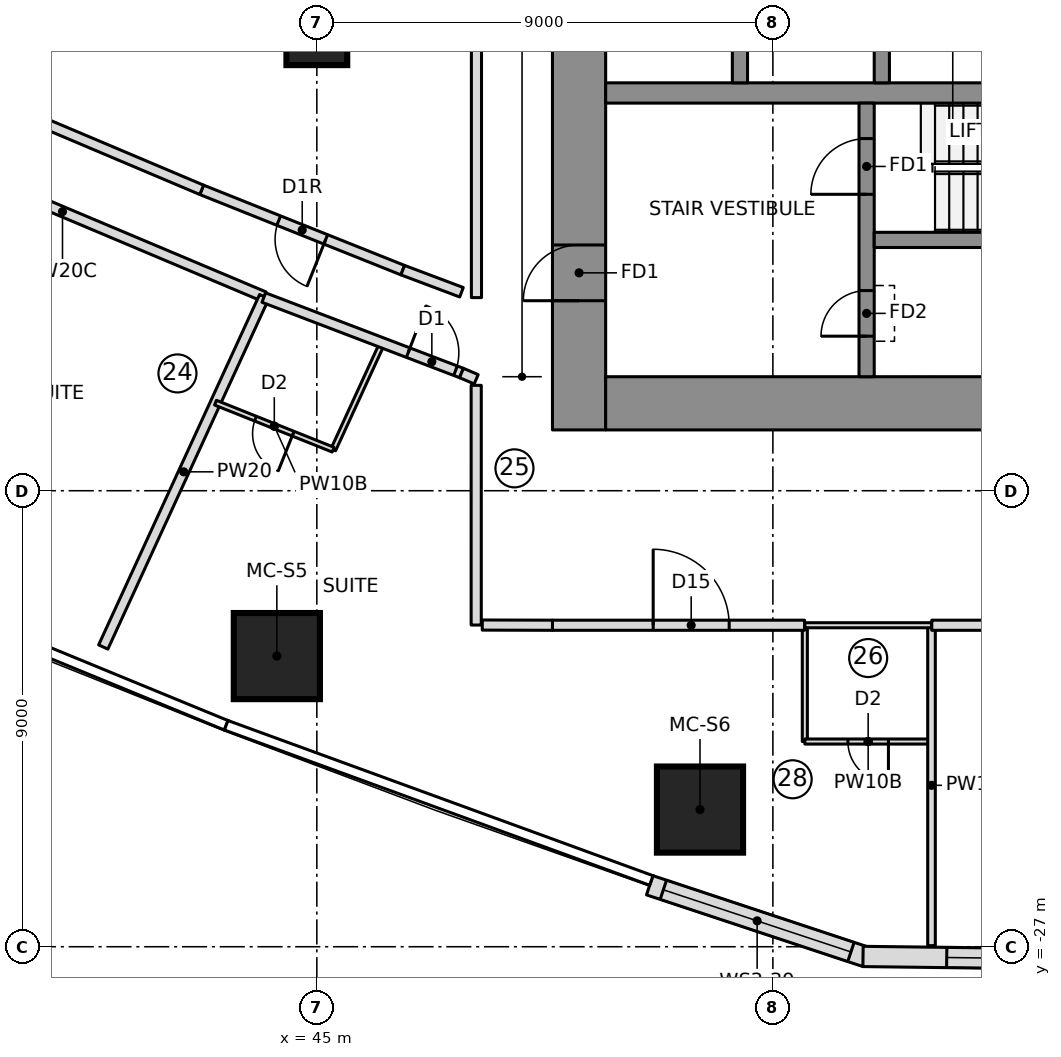
"""IFC4 building model, lengths in metres.
Left out: names, types, materials, properties, quantities, classifications, styles, units other than length and angle.
Written with IfcOpenShell. Run it as: python <this file> out.ifc"""

import sys

from ifc_helpers import new_model, si_unit, direction, frame, frame_2d, origin, origin_2d, place, context, subcontext, project, spatial, polyline, rectangle, outline, extrude, element, fill, save


model = new_model("IFC4")
c1 = context("Model", 3, precision=1e-05, world=origin(), true_north=direction((0.0, 1.0)))
c2 = subcontext(c1, "Body", "Model", "MODEL_VIEW")
j1 = project(units=[si_unit("LENGTHUNIT", "METRE"), si_unit("PLANEANGLEUNIT", "RADIAN")], contexts=[c1])
p1 = place(None, origin())
s1 = spatial("IfcSite", under=j1, at=p1, CompositionType="ELEMENT")
p2 = place(p1, origin())
s2 = spatial("IfcBuilding", under=s1, at=p2, CompositionType="ELEMENT")
p3 = place(p2, frame((0.0, 0.0, 92.0)))
s3 = spatial("IfcBuildingStorey", under=s2, at=p3, CompositionType="ELEMENT", Elevation=92.0)
p4 = place(p3, frame((50.175, -16.8, 0.0), z_axis=(0.0, 0.0, 1.0), x_axis=(0.0, 1.0, 0.0)))
e1 = element("IfcWall", 1, at=p4, inside=s3, PredefinedType="SHEAR", context=c2, shape_type="SweptSolid", body=[
    extrude(rectangle(XDim=10.15, YDim=1.05, at=frame_2d((5.075, 0.0))), origin(), (0.0, 0.0, 1.0), 3.55),
])
p5 = place(p4, frame((2.55, 0.0, 0.0)))
e2 = element("IfcOpeningElement", 2, at=p5, cuts=e1, PredefinedType="OPENING", context=c2, shape_type="SweptSolid", body=[
    extrude(rectangle(XDim=1.1, YDim=2.1, at=frame_2d((0.55, 1.05))), frame((0.0, 0.535, 0.0), z_axis=(0.0, -1.0, 0.0), x_axis=(1.0, 0.0, 0.0)), (0.0, 0.0, 1.0), 1.07),
])
p6 = place(p3, frame((50.7, -16.275, 0.0), z_axis=(0.0, 0.0, 1.0), x_axis=(1.0, 0.0, 0.0)))
e3 = element("IfcWall", 3, at=p6, inside=s3, PredefinedType="SHEAR", context=c2, shape_type="SweptSolid", body=[
    extrude(rectangle(XDim=14.07, YDim=1.05, at=frame_2d((7.035, 0.0))), origin(), (0.0, 0.0, 1.0), 3.55),
])
p7 = place(p3, frame((50.7, -10.15, 0.0), z_axis=(0.0, 0.0, 1.0), x_axis=(1.0, 0.0, 0.0)))
e4 = element("IfcWall", 4, at=p7, inside=s3, PredefinedType="SHEAR", context=c2, shape_type="SweptSolid", body=[
    extrude(rectangle(XDim=13.02, YDim=0.4, at=frame_2d((6.51, 0.0))), origin(), (0.0, 0.0, 1.0), 3.55),
])
for number, where, z_axis, x_axis in (
    (5, (53.35, -9.95, 0.0), (0.0, 0.0, 1.0), (0.0, 1.0, 0.0)),
    (6, (56.15, -9.95, 0.0), (0.0, 0.0, 1.0), (0.0, 1.0, 0.0)),
):
    element("IfcWall", number, at=place(p3, frame(where, z_axis=z_axis, x_axis=x_axis)), inside=s3, PredefinedType="SHEAR", context=c2, shape_type="SweptSolid", body=[
        extrude(rectangle(XDim=3.0, YDim=0.3, at=frame_2d((1.5, 0.0))), origin(), (0.0, 0.0, 1.0), 3.55),
    ])
p8 = place(p3, frame((55.85, -15.75, 0.0), z_axis=(0.0, 0.0, 1.0), x_axis=(0.0, 1.0, 0.0)))
e7 = element("IfcWall", 7, at=p8, inside=s3, PredefinedType="SHEAR", context=c2, shape_type="SweptSolid", body=[
    extrude(rectangle(XDim=5.4, YDim=0.3, at=frame_2d((2.7, 0.0))), origin(), (0.0, 0.0, 1.0), 3.55),
])
p9 = place(p8, frame((3.6, 0.0, 0.0)))
e8 = element("IfcOpeningElement", 8, at=p9, cuts=e7, PredefinedType="OPENING", context=c2, shape_type="SweptSolid", body=[
    extrude(rectangle(XDim=1.1, YDim=2.1, at=frame_2d((0.55, 1.05))), frame((0.0, 0.16, 0.0), z_axis=(0.0, -1.0, 0.0), x_axis=(1.0, 0.0, 0.0)), (0.0, 0.0, 1.0), 0.32),
])
p10 = place(p8, frame((0.8, 0.0, 0.0)))
e9 = element("IfcOpeningElement", 9, at=p10, cuts=e7, PredefinedType="OPENING", context=c2, shape_type="SweptSolid", body=[
    extrude(rectangle(XDim=0.9, YDim=2.1, at=frame_2d((0.45, 1.05))), frame((0.0, 0.16, 0.0), z_axis=(0.0, -1.0, 0.0), x_axis=(1.0, 0.0, 0.0)), (0.0, 0.0, 1.0), 0.32),
])
p11 = place(p3, frame((56.0, -13.05, 0.0), z_axis=(0.0, 0.0, 1.0), x_axis=(1.0, 0.0, 0.0)))
e10 = element("IfcWall", 10, at=p11, inside=s3, PredefinedType="SHEAR", context=c2, shape_type="SweptSolid", body=[
    extrude(rectangle(XDim=7.72, YDim=0.3, at=frame_2d((3.86, 0.0))), origin(), (0.0, 0.0, 1.0), 3.55),
])
for number, where, z_axis, x_axis in (
    (11, (44.211, -21.264, 0.0), (0.0, 0.0, 1.0), (1.0, 0.0, 0.0)),
    (12, (52.562, -24.293, 0.0), (0.0, 0.0, 1.0), (1.0, 0.0, 0.0)),
):
    element("IfcColumn", number, at=place(p3, frame(where, z_axis=z_axis, x_axis=x_axis)), inside=s3, PredefinedType="COLUMN", context=c2, shape_type="SweptSolid", body=[
        extrude(rectangle(XDim=1.7, YDim=1.7, at=origin_2d()), origin(), (0.0, 0.0, 1.0), 3.55),
    ])
p12 = place(p3, frame((45.0, -9.0, 0.0), z_axis=(0.0, 0.0, 1.0), x_axis=(1.0, 0.0, 0.0)))
e13 = element("IfcColumn", 13, at=p12, inside=s3, PredefinedType="COLUMN", context=c2, shape_type="SweptSolid", body=[
    extrude(rectangle(XDim=1.2, YDim=1.2, at=origin_2d()), origin(), (0.0, 0.0, 1.0), 3.55),
])
p13 = place(p3, frame((51.569, -25.787, 0.0), z_axis=(0.0, 0.0, 1.0), x_axis=(0.94925004851, -0.314522408429, 0.0)))
e14 = element("IfcWall", 14, at=p13, inside=s3, PredefinedType="NOTDEFINED", context=c2, shape_type="SweptSolid", body=[
    extrude(outline(polyline([(0.0, -0.2), (4.499, -0.2), (4.437, 0.2), (0.0, 0.2), (0.0, -0.2)])), origin(), (0.0, 0.0, 1.0), 3.25),
])
p14 = place(p13, frame((0.284, 0.0, 0.9)))
e15 = element("IfcOpeningElement", 15, at=p14, cuts=e14, PredefinedType="OPENING", context=c2, shape_type="SweptSolid", body=[
    extrude(rectangle(XDim=3.9, YDim=1.8, at=frame_2d((1.95, 0.9))), frame((0.0, 0.21, 0.0), z_axis=(0.0, -1.0, 0.0), x_axis=(1.0, 0.0, 0.0)), (0.0, 0.0, 1.0), 0.42),
])
p15 = place(p3, frame((55.81, -27.192, 0.0), z_axis=(0.0, 0.0, 1.0), x_axis=(0.999919718849, -0.012671063772, 0.0)))
e16 = element("IfcWall", 16, at=p15, inside=s3, PredefinedType="NOTDEFINED", context=c2, shape_type="SweptSolid", body=[
    extrude(outline(polyline([(-0.031, -0.2), (4.3, -0.2), (4.177, 0.2), (0.031, 0.2), (-0.031, -0.2)])), origin(), (0.0, 0.0, 1.0), 3.25),
])
p16 = place(p15, frame((1.621, 0.0, 0.6)))
e17 = element("IfcOpeningElement", 17, at=p16, cuts=e16, PredefinedType="OPENING", context=c2, shape_type="SweptSolid", body=[
    extrude(outline(polyline([(0.0, 1.35), (0.084, 1.771), (0.322, 2.128), (0.679, 2.366), (1.1, 2.45), (1.521, 2.366), (1.878, 2.128), (2.116, 1.771), (2.2, 1.35), (2.2, 1.1), (2.116, 0.679), (1.878, 0.322), (1.521, 0.084), (1.1, 0.0), (0.679, 0.084), (0.322, 0.322), (0.084, 0.679), (0.0, 1.1), (0.0, 1.35)])), frame((0.0, 0.21, 0.0), z_axis=(0.0, -1.0, 0.0), x_axis=(1.0, 0.0, 0.0)), (0.0, 0.0, 1.0), 0.42),
])
p17 = place(p3, frame((54.631, -22.95, 0.0), z_axis=(0.0, 0.0, 1.0), x_axis=(0.0, 1.0, 0.0)))
e18 = element("IfcWall", 18, at=p17, inside=s3, PredefinedType="PARTITIONING", context=c2, shape_type="SweptSolid", body=[
    extrude(rectangle(XDim=2.3, YDim=0.1, at=frame_2d((1.15, 0.0))), origin(), (0.0, 0.0, 1.0), 3.25),
])
p18 = place(p3, frame((57.131, -22.95, 0.0), z_axis=(0.0, 0.0, 1.0), x_axis=(-1.0, 0.0, 0.0)))
e19 = element("IfcWall", 19, at=p18, inside=s3, PredefinedType="PARTITIONING", context=c2, shape_type="SweptSolid", body=[
    extrude(rectangle(XDim=2.5, YDim=0.1, at=frame_2d((1.25, 0.0))), origin(), (0.0, 0.0, 1.0), 3.25),
])
p19 = place(p18, frame((0.85, 0.0, 0.0)))
e20 = element("IfcOpeningElement", 20, at=p19, cuts=e19, PredefinedType="OPENING", context=c2, shape_type="SweptSolid", body=[
    extrude(rectangle(XDim=0.8, YDim=2.1, at=frame_2d((0.4, 1.05))), frame((0.0, 0.06, 0.0), z_axis=(0.0, -1.0, 0.0), x_axis=(1.0, 0.0, 0.0)), (0.0, 0.0, 1.0), 0.12),
])
p20 = place(p3, frame((57.131, -26.979, 0.0), z_axis=(0.0, 0.0, 1.0), x_axis=(0.0, 1.0, 0.0)))
e21 = element("IfcWall", 21, at=p20, inside=s3, PredefinedType="PARTITIONING", context=c2, shape_type="SweptSolid", body=[
    extrude(rectangle(XDim=6.329, YDim=0.15, at=frame_2d((3.165, 0.0))), origin(), (0.0, 0.0, 1.0), 3.25),
])
p21 = place(p3, frame((36.0, -10.815, 0.0), z_axis=(0.0, 0.0, 1.0), x_axis=(0.921519373184, -0.388332389644, 0.0)))
e22 = element("IfcWall", 22, at=p21, inside=s3, PredefinedType="PARTITIONING", context=c2, shape_type="SweptSolid", body=[
    extrude(rectangle(XDim=8.639, YDim=0.2, at=frame_2d((4.32, 0.0))), origin(), (0.0, 0.0, 1.0), 3.25),
])
p22 = place(p21, frame((2.05, 0.0, 0.0)))
e23 = element("IfcOpeningElement", 23, at=p22, cuts=e22, PredefinedType="OPENING", context=c2, shape_type="SweptSolid", body=[
    extrude(rectangle(XDim=1.5, YDim=2.1, at=frame_2d((0.75, 1.05))), frame((0.0, 0.11, 0.0), z_axis=(0.0, -1.0, 0.0), x_axis=(1.0, 0.0, 0.0)), (0.0, 0.0, 1.0), 0.22),
])
p23 = place(p3, frame((40.785, -21.085, 0.0), z_axis=(0.0, 0.0, 1.0), x_axis=(0.417427858403, 0.908710065438, 0.0)))
e24 = element("IfcWall", 24, at=p23, inside=s3, PredefinedType="PARTITIONING", context=c2, shape_type="SweptSolid", body=[
    extrude(rectangle(XDim=7.61, YDim=0.2, at=frame_2d((3.805, 0.0))), origin(), (0.0, 0.0, 1.0), 3.25),
])
p24 = place(p3, frame((46.278, -15.116, 0.0), z_axis=(0.0, 0.0, 1.0), x_axis=(-0.417409478396, -0.90871850831, 0.0)))
e25 = element("IfcWall", 25, at=p24, inside=s3, PredefinedType="PARTITIONING", context=c2, shape_type="SweptSolid", body=[
    extrude(rectangle(XDim=2.283, YDim=0.1, at=frame_2d((1.142, 0.0))), origin(), (0.0, 0.0, 1.0), 3.25),
])
p25 = place(p3, frame((45.321, -17.19, 0.0), z_axis=(0.0, 0.0, 1.0), x_axis=(-0.928618072339, 0.371037027431, 0.0)))
e26 = element("IfcWall", 26, at=p25, inside=s3, PredefinedType="PARTITIONING", context=c2, shape_type="SweptSolid", body=[
    extrude(rectangle(XDim=2.5, YDim=0.1, at=frame_2d((1.25, 0.0))), origin(), (0.0, 0.0, 1.0), 3.25),
])
p26 = place(p25, frame((0.85, 0.0, 0.0)))
e27 = element("IfcOpeningElement", 27, at=p26, cuts=e26, PredefinedType="OPENING", context=c2, shape_type="SweptSolid", body=[
    extrude(rectangle(XDim=0.8, YDim=2.1, at=frame_2d((0.4, 1.05))), frame((0.0, 0.06, 0.0), z_axis=(0.0, -1.0, 0.0), x_axis=(1.0, 0.0, 0.0)), (0.0, 0.0, 1.0), 0.12),
])
p27 = place(p3, frame((46.696, -13.647, 0.0), z_axis=(0.0, 0.0, 1.0), x_axis=(-0.928638161177, 0.370986745864, 0.0)))
e28 = element("IfcWall", 28, at=p27, inside=s3, PredefinedType="PARTITIONING", context=c2, shape_type="SweptSolid", body=[
    extrude(rectangle(XDim=4.273, YDim=0.2, at=frame_2d((2.136, 0.0))), origin(), (0.0, 0.0, 1.0), 3.25),
])
p28 = place(p27, frame((1.636, 0.0, 0.0)))
e29 = element("IfcOpeningElement", 29, at=p28, cuts=e28, PredefinedType="OPENING", context=c2, shape_type="SweptSolid", body=[
    extrude(rectangle(XDim=1.0, YDim=2.1, at=frame_2d((0.5, 1.05))), frame((0.0, 0.11, 0.0), z_axis=(0.0, -1.0, 0.0), x_axis=(1.0, 0.0, 0.0)), (0.0, 0.0, 1.0), 0.22),
])
p29 = place(p3, frame((42.728, -12.062, 0.0), z_axis=(0.0, 0.0, 1.0), x_axis=(-0.92101730011, 0.389521671923, 0.0)))
e30 = element("IfcWall", 30, at=p29, inside=s3, PredefinedType="PARTITIONING", context=c2, shape_type="SweptSolid", body=[
    extrude(rectangle(XDim=3.702, YDim=0.2, at=frame_2d((1.851, 0.0))), origin(), (0.0, 0.0, 1.0), 3.25),
])
p30 = place(p3, frame((49.65, -20.655, 0.0), z_axis=(0.0, 0.0, 1.0), x_axis=(1.0, 0.0, 0.0)))
e31 = element("IfcWall", 31, at=p30, inside=s3, PredefinedType="PARTITIONING", context=c2, shape_type="SweptSolid", body=[
    extrude(rectangle(XDim=4.976, YDim=0.2, at=frame_2d((2.488, 0.0))), origin(), (0.0, 0.0, 1.0), 3.25),
])
p31 = place(p30, frame((1.988, 0.0, 0.0)))
e32 = element("IfcOpeningElement", 32, at=p31, cuts=e31, PredefinedType="OPENING", context=c2, shape_type="SweptSolid", body=[
    extrude(rectangle(XDim=1.5, YDim=2.1, at=frame_2d((0.75, 1.05))), frame((0.0, 0.11, 0.0), z_axis=(0.0, -1.0, 0.0), x_axis=(1.0, 0.0, 0.0)), (0.0, 0.0, 1.0), 0.22),
])
p32 = place(p3, frame((57.135, -20.655, 0.0), z_axis=(0.0, 0.0, 1.0), x_axis=(1.0, 0.0, 0.0)))
e33 = element("IfcWall", 33, at=p32, inside=s3, PredefinedType="PARTITIONING", context=c2, shape_type="SweptSolid", body=[
    extrude(rectangle(XDim=4.971, YDim=0.2, at=frame_2d((2.485, 0.0))), origin(), (0.0, 0.0, 1.0), 3.25),
])
p33 = place(p32, frame((1.985, 0.0, 0.0)))
e34 = element("IfcOpeningElement", 34, at=p33, cuts=e33, PredefinedType="OPENING", context=c2, shape_type="SweptSolid", body=[
    extrude(rectangle(XDim=1.0, YDim=2.1, at=frame_2d((0.5, 1.05))), frame((0.0, 0.11, 0.0), z_axis=(0.0, -1.0, 0.0), x_axis=(1.0, 0.0, 0.0)), (0.0, 0.0, 1.0), 0.22),
])
p34 = place(p3, frame((54.631, -20.655, 0.0), z_axis=(0.0, 0.0, 1.0), x_axis=(1.0, 0.0, 0.0)))
e35 = element("IfcWall", 35, at=p34, inside=s3, PredefinedType="PARTITIONING", context=c2, shape_type="SweptSolid", body=[
    extrude(rectangle(XDim=2.5, YDim=0.1, at=frame_2d((1.25, 0.0))), origin(), (0.0, 0.0, 1.0), 3.25),
])
p35 = place(p3, frame((43.953, -14.188, 0.0), z_axis=(0.0, 0.0, 1.0), x_axis=(0.934288494055, -0.356517895592, 0.0)))
e36 = element("IfcWall", 36, at=p35, inside=s3, PredefinedType="PARTITIONING", context=c2, shape_type="SweptSolid", body=[
    extrude(rectangle(XDim=4.177, YDim=0.2, at=frame_2d((2.088, 0.0))), origin(), (0.0, 0.0, 1.0), 3.25),
])
p36 = place(p35, frame((3.05, 0.0, 0.0)))
e37 = element("IfcOpeningElement", 37, at=p36, cuts=e36, PredefinedType="OPENING", context=c2, shape_type="SweptSolid", body=[
    extrude(rectangle(XDim=1.0, YDim=2.1, at=frame_2d((0.5, 1.05))), frame((0.0, 0.11, 0.0), z_axis=(0.0, -1.0, 0.0), x_axis=(1.0, 0.0, 0.0)), (0.0, 0.0, 1.0), 0.22),
])
p37 = place(p3, frame((47.855, -14.083, 0.0), z_axis=(0.0, 0.0, 1.0), x_axis=(-0.935907269358, 0.352246480696, 0.0)))
e38 = element("IfcWall", 38, at=p37, inside=s3, PredefinedType="PARTITIONING", context=c2, shape_type="SweptSolid", body=[
    extrude(rectangle(XDim=1.239, YDim=0.2, at=frame_2d((0.619, 0.0))), origin(), (0.0, 0.0, 1.0), 3.25),
])
p38 = place(p3, frame((48.15, 14.189, 0.0), z_axis=(0.0, 0.0, 1.0), x_axis=(0.0, -1.0, 0.0)))
e39 = element("IfcWall", 39, at=p38, inside=s3, PredefinedType="PARTITIONING", context=c2, shape_type="SweptSolid", body=[
    extrude(rectangle(XDim=28.377, YDim=0.2, at=frame_2d((14.189, 0.0))), origin(), (0.0, 0.0, 1.0), 3.25),
])
p39 = place(p3, frame((47.855, -15.677, 0.0), z_axis=(0.0, 0.0, 1.0), x_axis=(0.919863783517, -0.392237963199, 0.0)))
e40 = element("IfcWall", 40, at=p39, inside=s3, PredefinedType="PARTITIONING", context=c2, shape_type="SweptSolid", body=[
    extrude(rectangle(XDim=0.316, YDim=0.2, at=frame_2d((0.158, 0.0))), origin(), (0.0, 0.0, 1.0), 3.25),
])
p40 = place(p3, frame((48.145, -15.92, 0.0), z_axis=(0.0, 0.0, 1.0), x_axis=(-5.1610239e-05, -0.999999998668, 0.0)))
e41 = element("IfcWall", 41, at=p40, inside=s3, PredefinedType="PARTITIONING", context=c2, shape_type="SweptSolid", body=[
    extrude(rectangle(XDim=4.73, YDim=0.2, at=frame_2d((2.365, 0.0))), origin(), (0.0, 0.0, 1.0), 3.25),
])
p41 = place(p3, frame((48.265, -20.651, 0.0), z_axis=(0.0, 0.0, 1.0), x_axis=(0.999996503144, -0.002644560569, 0.0)))
e42 = element("IfcWall", 42, at=p41, inside=s3, PredefinedType="PARTITIONING", context=c2, shape_type="SweptSolid", body=[
    extrude(rectangle(XDim=1.385, YDim=0.2, at=frame_2d((0.692, 0.0))), origin(), (0.0, 0.0, 1.0), 3.25),
])
p42 = place(p14, origin())
e43 = element("IfcWindow", 43, at=p42, inside=s3, PartitioningType="SINGLE_PANEL", PredefinedType="WINDOW", context=c2, shape_type="SweptSolid", body=[
    extrude(rectangle(XDim=3.9, YDim=1.8, at=frame_2d((1.95, 0.9))), frame((0.0, 0.17, 0.0), z_axis=(0.0, -1.0, 0.0), x_axis=(1.0, 0.0, 0.0)), (0.0, 0.0, 1.0), 0.06),
])
fill(e15, e43)
p43 = place(p16, origin())
e44 = element("IfcWindow", 44, at=p43, inside=s3, PartitioningType="SINGLE_PANEL", PredefinedType="WINDOW", context=c2, shape_type="SweptSolid", body=[
    extrude(outline(polyline([(0.0, 1.35), (0.084, 1.771), (0.322, 2.128), (0.679, 2.366), (1.1, 2.45), (1.521, 2.366), (1.878, 2.128), (2.116, 1.771), (2.2, 1.35), (2.2, 1.1), (2.116, 0.679), (1.878, 0.322), (1.521, 0.084), (1.1, 0.0), (0.679, 0.084), (0.322, 0.322), (0.084, 0.679), (0.0, 1.1), (0.0, 1.35)])), frame((0.0, 0.17, 0.0), z_axis=(0.0, -1.0, 0.0), x_axis=(1.0, 0.0, 0.0)), (0.0, 0.0, 1.0), 0.06),
])
fill(e17, e44)
p44 = place(p19, origin())
e45 = element("IfcDoor", 45, at=p44, inside=s3, OperationType="SINGLE_SWING_LEFT", PredefinedType="DOOR", context=c2, shape_type="SweptSolid", body=[
    extrude(rectangle(XDim=0.8, YDim=2.1, at=frame_2d((0.4, 1.05))), frame((0.0, 0.025, 0.0), z_axis=(0.0, -1.0, 0.0), x_axis=(1.0, 0.0, 0.0)), (0.0, 0.0, 1.0), 0.05),
])
fill(e20, e45)
p45 = place(p26, origin())
e46 = element("IfcDoor", 46, at=p45, inside=s3, OperationType="SINGLE_SWING_LEFT", PredefinedType="DOOR", context=c2, shape_type="SweptSolid", body=[
    extrude(rectangle(XDim=0.8, YDim=2.1, at=frame_2d((0.4, 1.05))), frame((0.0, 0.025, 0.0), z_axis=(0.0, -1.0, 0.0), x_axis=(1.0, 0.0, 0.0)), (0.0, 0.0, 1.0), 0.05),
])
fill(e27, e46)
p46 = place(p36, origin())
e47 = element("IfcDoor", 47, at=p46, inside=s3, OperationType="SINGLE_SWING_LEFT", PredefinedType="DOOR", context=c2, shape_type="SweptSolid", body=[
    extrude(rectangle(XDim=1.0, YDim=2.1, at=frame_2d((0.5, 1.05))), frame((0.0, 0.025, 0.0), z_axis=(0.0, -1.0, 0.0), x_axis=(1.0, 0.0, 0.0)), (0.0, 0.0, 1.0), 0.05),
])
fill(e37, e47)
p47 = place(p28, origin())
e48 = element("IfcDoor", 48, at=p47, inside=s3, OperationType="SINGLE_SWING_RIGHT", PredefinedType="DOOR", context=c2, shape_type="SweptSolid", body=[
    extrude(rectangle(XDim=1.0, YDim=2.1, at=frame_2d((0.5, 1.05))), frame((0.0, 0.025, 0.0), z_axis=(0.0, -1.0, 0.0), x_axis=(1.0, 0.0, 0.0)), (0.0, 0.0, 1.0), 0.05),
])
fill(e29, e48)
p48 = place(p31, origin())
e49 = element("IfcDoor", 49, at=p48, inside=s3, OperationType="DOUBLE_DOOR_SINGLE_SWING", PredefinedType="DOOR", context=c2, shape_type="SweptSolid", body=[
    extrude(rectangle(XDim=1.5, YDim=2.1, at=frame_2d((0.75, 1.05))), frame((0.0, 0.025, 0.0), z_axis=(0.0, -1.0, 0.0), x_axis=(1.0, 0.0, 0.0)), (0.0, 0.0, 1.0), 0.05),
])
fill(e32, e49)
p49 = place(p9, origin())
e50 = element("IfcDoor", 50, at=p49, inside=s3, OperationType="SINGLE_SWING_RIGHT", PredefinedType="DOOR", context=c2, shape_type="SweptSolid", body=[
    extrude(rectangle(XDim=1.1, YDim=2.1, at=frame_2d((0.55, 1.05))), frame((0.0, 0.025, 0.0), z_axis=(0.0, -1.0, 0.0), x_axis=(1.0, 0.0, 0.0)), (0.0, 0.0, 1.0), 0.05),
])
fill(e8, e50)
p50 = place(p5, origin())
e51 = element("IfcDoor", 51, at=p50, inside=s3, OperationType="SINGLE_SWING_RIGHT", PredefinedType="DOOR", context=c2, shape_type="SweptSolid", body=[
    extrude(rectangle(XDim=1.1, YDim=2.1, at=frame_2d((0.55, 1.05))), frame((0.0, 0.025, 0.0), z_axis=(0.0, -1.0, 0.0), x_axis=(1.0, 0.0, 0.0)), (0.0, 0.0, 1.0), 0.05),
])
fill(e2, e51)
p51 = place(p10, origin())
e52 = element("IfcDoor", 52, at=p51, inside=s3, OperationType="SINGLE_SWING_LEFT", PredefinedType="DOOR", context=c2, shape_type="SweptSolid", body=[
    extrude(rectangle(XDim=0.9, YDim=2.1, at=frame_2d((0.45, 1.05))), frame((0.0, 0.025, 0.0), z_axis=(0.0, -1.0, 0.0), x_axis=(1.0, 0.0, 0.0)), (0.0, 0.0, 1.0), 0.05),
])
fill(e9, e52)
save(model, sys.argv[1])
